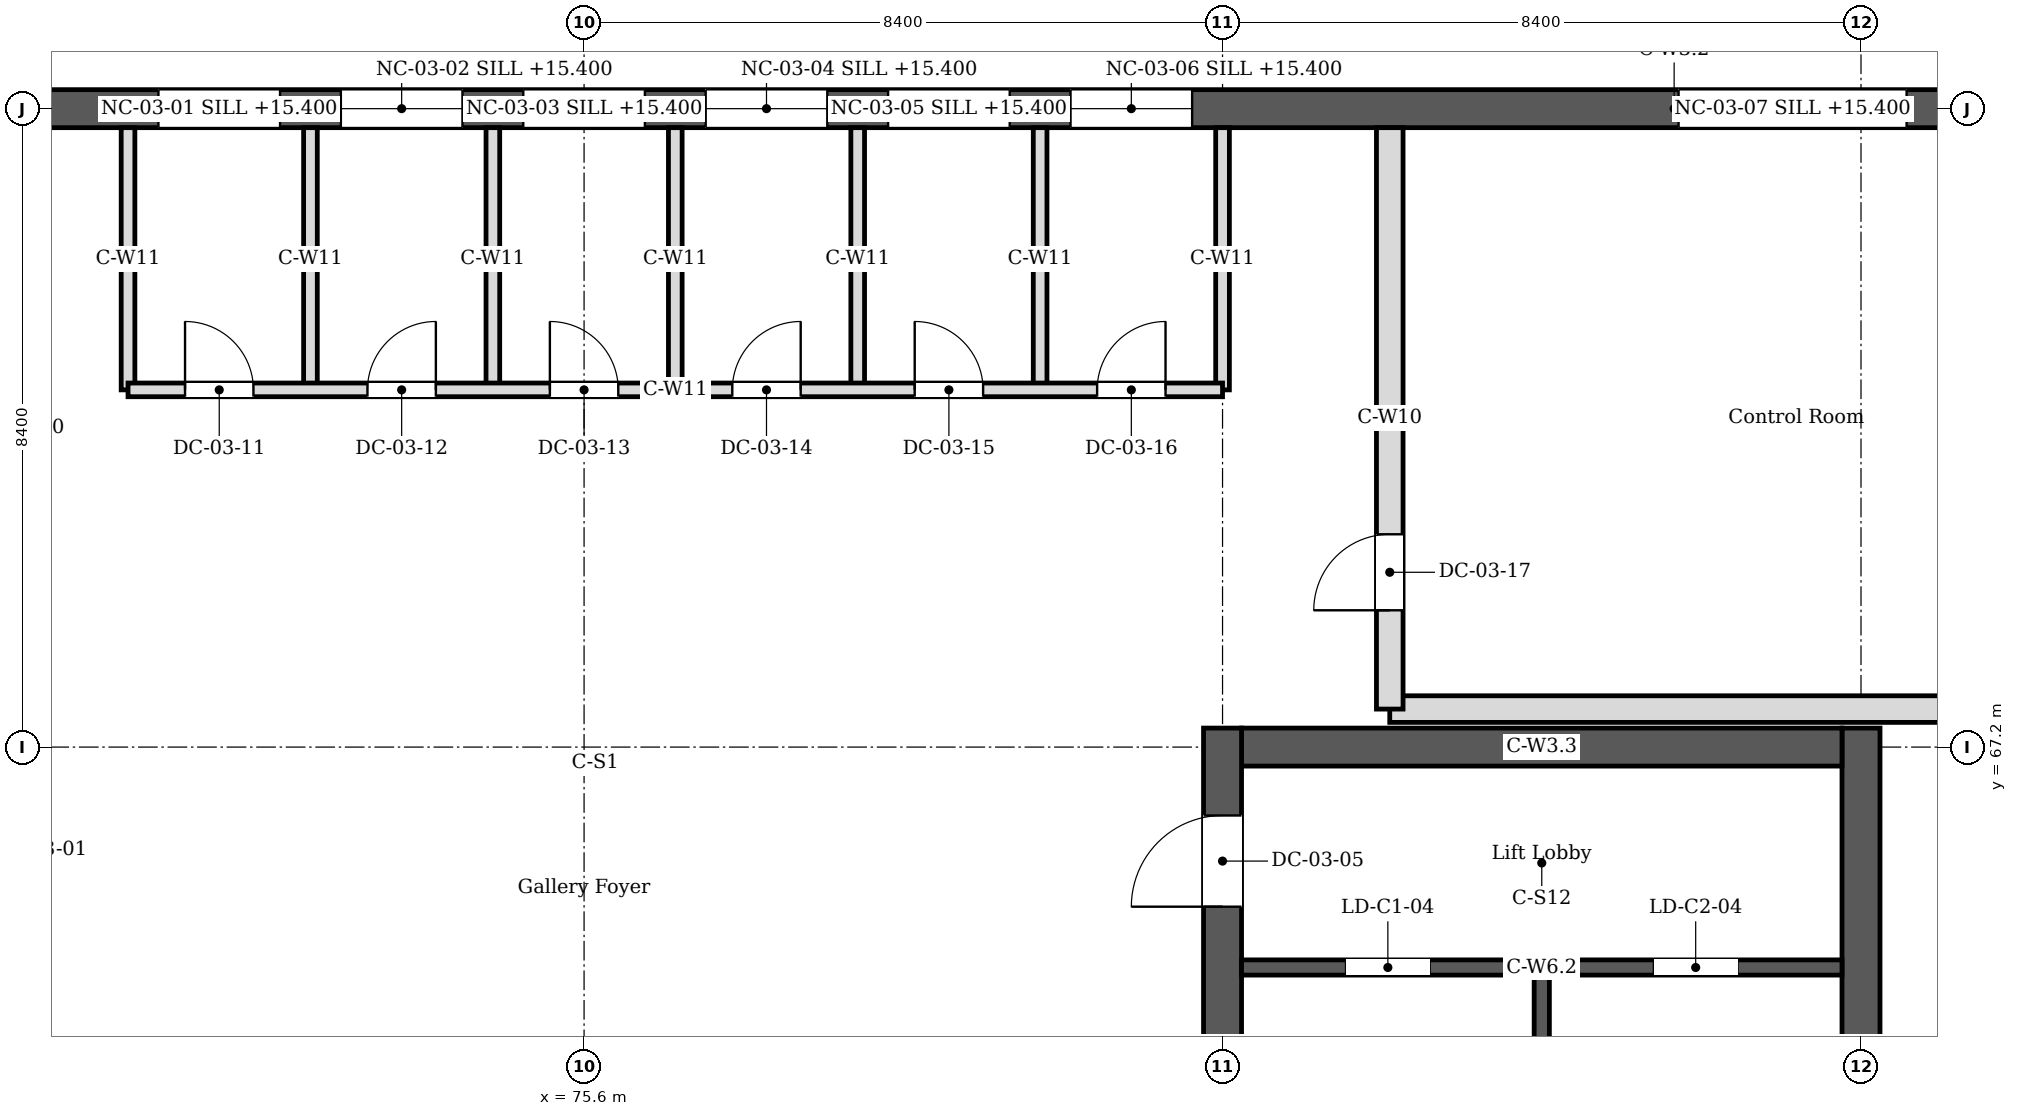
"""IFC4 building model, lengths in metres.
Left out: names, types, materials, properties, quantities, classifications, styles, units other than length and angle.
Written with IfcOpenShell. Run it as: python <this file> out.ifc"""

import sys

from ifc_helpers import new_model, si_unit, direction, frame, frame_2d, origin, place, context, subcontext, project, spatial, rectangle, extrude, element, fill, save


model = new_model("IFC4")
c1 = context("Model", 3, precision=1e-05, world=origin(), true_north=direction((0.0, 1.0)))
c2 = subcontext(c1, "Body", "Model", "MODEL_VIEW")
j1 = project(units=[si_unit("LENGTHUNIT", "METRE"), si_unit("PLANEANGLEUNIT", "RADIAN")], contexts=[c1])
p1 = place(None, origin())
s1 = spatial("IfcSite", under=j1, at=p1, CompositionType="ELEMENT")
p2 = place(p1, origin())
s2 = spatial("IfcBuilding", under=s1, at=p2, CompositionType="ELEMENT")
p3 = place(p2, frame((0.0, 0.0, 14.4)))
s3 = spatial("IfcBuildingStorey", under=s2, at=p3, CompositionType="ELEMENT", Elevation=14.4)
p4 = place(p3, frame((59.25, 75.6, 0.0), z_axis=(0.0, 0.0, 1.0), x_axis=(1.0, 0.0, 0.0)))
e1 = element("IfcWall", 1, at=p4, inside=s3, PredefinedType="SOLIDWALL", context=c2, shape_type="SweptSolid", body=[
    extrude(rectangle(XDim=57.9, YDim=0.5, at=frame_2d((28.95, 0.0))), origin(), (0.0, 0.0, 1.0), 4.2),
])
p5 = place(p4, frame((10.75, 0.0, 1.0)))
e2 = element("IfcOpeningElement", 2, at=p5, cuts=e1, PredefinedType="OPENING", context=c2, shape_type="SweptSolid", body=[
    extrude(rectangle(XDim=1.6, YDim=1.2, at=frame_2d((0.8, 0.6))), frame((0.0, 0.26, 0.0), z_axis=(0.0, -1.0, 0.0), x_axis=(1.0, 0.0, 0.0)), (0.0, 0.0, 1.0), 0.52),
])
p6 = place(p4, frame((13.15, 0.0, 1.0)))
e3 = element("IfcOpeningElement", 3, at=p6, cuts=e1, PredefinedType="OPENING", context=c2, shape_type="SweptSolid", body=[
    extrude(rectangle(XDim=1.6, YDim=1.2, at=frame_2d((0.8, 0.6))), frame((0.0, 0.26, 0.0), z_axis=(0.0, -1.0, 0.0), x_axis=(1.0, 0.0, 0.0)), (0.0, 0.0, 1.0), 0.52),
])
p7 = place(p4, frame((15.55, 0.0, 1.0)))
e4 = element("IfcOpeningElement", 4, at=p7, cuts=e1, PredefinedType="OPENING", context=c2, shape_type="SweptSolid", body=[
    extrude(rectangle(XDim=1.6, YDim=1.2, at=frame_2d((0.8, 0.6))), frame((0.0, 0.26, 0.0), z_axis=(0.0, -1.0, 0.0), x_axis=(1.0, 0.0, 0.0)), (0.0, 0.0, 1.0), 0.52),
])
p8 = place(p4, frame((17.95, 0.0, 1.0)))
e5 = element("IfcOpeningElement", 5, at=p8, cuts=e1, PredefinedType="OPENING", context=c2, shape_type="SweptSolid", body=[
    extrude(rectangle(XDim=1.6, YDim=1.2, at=frame_2d((0.8, 0.6))), frame((0.0, 0.26, 0.0), z_axis=(0.0, -1.0, 0.0), x_axis=(1.0, 0.0, 0.0)), (0.0, 0.0, 1.0), 0.52),
])
p9 = place(p4, frame((20.35, 0.0, 1.0)))
e6 = element("IfcOpeningElement", 6, at=p9, cuts=e1, PredefinedType="OPENING", context=c2, shape_type="SweptSolid", body=[
    extrude(rectangle(XDim=1.6, YDim=1.2, at=frame_2d((0.8, 0.6))), frame((0.0, 0.26, 0.0), z_axis=(0.0, -1.0, 0.0), x_axis=(1.0, 0.0, 0.0)), (0.0, 0.0, 1.0), 0.52),
])
p10 = place(p4, frame((22.75, 0.0, 1.0)))
e7 = element("IfcOpeningElement", 7, at=p10, cuts=e1, PredefinedType="OPENING", context=c2, shape_type="SweptSolid", body=[
    extrude(rectangle(XDim=1.6, YDim=1.2, at=frame_2d((0.8, 0.6))), frame((0.0, 0.26, 0.0), z_axis=(0.0, -1.0, 0.0), x_axis=(1.0, 0.0, 0.0)), (0.0, 0.0, 1.0), 0.52),
])
p11 = place(p4, frame((30.75, 0.0, 1.0)))
e8 = element("IfcOpeningElement", 8, at=p11, cuts=e1, PredefinedType="OPENING", context=c2, shape_type="SweptSolid", body=[
    extrude(rectangle(XDim=3.0, YDim=1.2, at=frame_2d((1.5, 0.6))), frame((0.0, 0.26, 0.0), z_axis=(0.0, -1.0, 0.0), x_axis=(1.0, 0.0, 0.0)), (0.0, 0.0, 1.0), 0.52),
])
p12 = place(p4, frame((42.25, 0.0, 1.0)))
e9 = element("IfcOpeningElement", 9, at=p12, cuts=e1, PredefinedType="OPENING", context=c2, shape_type="SweptSolid", body=[
    extrude(rectangle(XDim=3.0, YDim=1.2, at=frame_2d((1.5, 0.6))), frame((0.0, 0.26, 0.0), z_axis=(0.0, -1.0, 0.0), x_axis=(1.0, 0.0, 0.0)), (0.0, 0.0, 1.0), 0.52),
])
p13 = place(p3, frame((92.4, 59.05, 0.0), z_axis=(0.0, 0.0, 1.0), x_axis=(0.0, 1.0, 0.0)))
e10 = element("IfcWall", 10, at=p13, inside=s3, PredefinedType="SOLIDWALL", context=c2, shape_type="SweptSolid", body=[
    extrude(rectangle(XDim=8.4, YDim=0.5, at=frame_2d((4.2, 0.0))), origin(), (0.0, 0.0, 1.0), 3.8),
])
p14 = place(p3, frame((84.0, 59.05, 0.0), z_axis=(0.0, 0.0, 1.0), x_axis=(0.0, 1.0, 0.0)))
e11 = element("IfcWall", 11, at=p14, inside=s3, PredefinedType="SOLIDWALL", context=c2, shape_type="SweptSolid", body=[
    extrude(rectangle(XDim=8.4, YDim=0.5, at=frame_2d((4.2, 0.0))), origin(), (0.0, 0.0, 1.0), 3.8),
])
p15 = place(p14, frame((6.05, 0.0, 0.0)))
e12 = element("IfcOpeningElement", 12, at=p15, cuts=e11, PredefinedType="OPENING", context=c2, shape_type="SweptSolid", body=[
    extrude(rectangle(XDim=1.2, YDim=2.1, at=frame_2d((0.6, 1.05))), frame((0.0, 0.26, 0.0), z_axis=(0.0, -1.0, 0.0), x_axis=(1.0, 0.0, 0.0)), (0.0, 0.0, 1.0), 0.52),
])
p16 = place(p3, frame((84.25, 67.2, 0.0), z_axis=(0.0, 0.0, 1.0), x_axis=(1.0, 0.0, 0.0)))
e13 = element("IfcWall", 13, at=p16, inside=s3, PredefinedType="SOLIDWALL", context=c2, shape_type="SweptSolid", body=[
    extrude(rectangle(XDim=7.9, YDim=0.5, at=frame_2d((3.95, 0.0))), origin(), (0.0, 0.0, 1.0), 3.8),
])
p17 = place(p3, frame((88.2, 59.05, 0.0), z_axis=(0.0, 0.0, 1.0), x_axis=(0.0, 1.0, 0.0)))
e14 = element("IfcWall", 14, at=p17, inside=s3, PredefinedType="PARTITIONING", context=c2, shape_type="SweptSolid", body=[
    extrude(rectangle(XDim=5.25, YDim=0.2, at=frame_2d((2.625, 0.0))), origin(), (0.0, 0.0, 1.0), 3.8),
])
p18 = place(p3, frame((84.25, 64.3, 0.0), z_axis=(0.0, 0.0, 1.0), x_axis=(1.0, 0.0, 0.0)))
e15 = element("IfcWall", 15, at=p18, inside=s3, PredefinedType="PARTITIONING", context=c2, shape_type="SweptSolid", body=[
    extrude(rectangle(XDim=7.9, YDim=0.2, at=frame_2d((3.95, 0.0))), origin(), (0.0, 0.0, 1.0), 3.8),
])
p19 = place(p18, frame((1.375, 0.0, 0.0)))
e16 = element("IfcOpeningElement", 16, at=p19, cuts=e15, PredefinedType="OPENING", context=c2, shape_type="SweptSolid", body=[
    extrude(rectangle(XDim=1.1, YDim=2.1, at=frame_2d((0.55, 1.05))), frame((0.0, 0.11, 0.0), z_axis=(0.0, -1.0, 0.0), x_axis=(1.0, 0.0, 0.0)), (0.0, 0.0, 1.0), 0.22),
])
p20 = place(p18, frame((5.425, 0.0, 0.0)))
e17 = element("IfcOpeningElement", 17, at=p20, cuts=e15, PredefinedType="OPENING", context=c2, shape_type="SweptSolid", body=[
    extrude(rectangle(XDim=1.1, YDim=2.1, at=frame_2d((0.55, 1.05))), frame((0.0, 0.11, 0.0), z_axis=(0.0, -1.0, 0.0), x_axis=(1.0, 0.0, 0.0)), (0.0, 0.0, 1.0), 0.22),
])
for number, where, z_axis, x_axis in (
    (18, (69.6, 71.9, 0.0), (0.0, 0.0, 1.0), (0.0, 1.0, 0.0)),
    (19, (72.0, 71.9, 0.0), (0.0, 0.0, 1.0), (0.0, 1.0, 0.0)),
    (20, (74.4, 71.9, 0.0), (0.0, 0.0, 1.0), (0.0, 1.0, 0.0)),
    (21, (76.8, 71.9, 0.0), (0.0, 0.0, 1.0), (0.0, 1.0, 0.0)),
    (22, (79.2, 71.9, 0.0), (0.0, 0.0, 1.0), (0.0, 1.0, 0.0)),
    (23, (81.6, 71.9, 0.0), (0.0, 0.0, 1.0), (0.0, 1.0, 0.0)),
    (24, (84.0, 71.9, 0.0), (0.0, 0.0, 1.0), (0.0, 1.0, 0.0)),
):
    element("IfcWall", number, at=place(p3, frame(where, z_axis=z_axis, x_axis=x_axis)), inside=s3, PredefinedType="PARTITIONING", context=c2, shape_type="SweptSolid", body=[
        extrude(rectangle(XDim=3.45, YDim=0.18, at=frame_2d((1.725, 0.0))), origin(), (0.0, 0.0, 1.0), 2.85),
    ])
p21 = place(p3, frame((69.6, 71.9, 0.0), z_axis=(0.0, 0.0, 1.0), x_axis=(1.0, 0.0, 0.0)))
e25 = element("IfcWall", 25, at=p21, inside=s3, PredefinedType="PARTITIONING", context=c2, shape_type="SweptSolid", body=[
    extrude(rectangle(XDim=14.4, YDim=0.18, at=frame_2d((7.2, 0.0))), origin(), (0.0, 0.0, 1.0), 2.85),
])
p22 = place(p21, frame((0.75, 0.0, 0.0)))
e26 = element("IfcOpeningElement", 26, at=p22, cuts=e25, PredefinedType="OPENING", context=c2, shape_type="SweptSolid", body=[
    extrude(rectangle(XDim=0.9, YDim=2.1, at=frame_2d((0.45, 1.05))), frame((0.0, 0.1, 0.0), z_axis=(0.0, -1.0, 0.0), x_axis=(1.0, 0.0, 0.0)), (0.0, 0.0, 1.0), 0.2),
])
p23 = place(p21, frame((3.15, 0.0, 0.0)))
e27 = element("IfcOpeningElement", 27, at=p23, cuts=e25, PredefinedType="OPENING", context=c2, shape_type="SweptSolid", body=[
    extrude(rectangle(XDim=0.9, YDim=2.1, at=frame_2d((0.45, 1.05))), frame((0.0, 0.1, 0.0), z_axis=(0.0, -1.0, 0.0), x_axis=(1.0, 0.0, 0.0)), (0.0, 0.0, 1.0), 0.2),
])
p24 = place(p21, frame((5.55, 0.0, 0.0)))
e28 = element("IfcOpeningElement", 28, at=p24, cuts=e25, PredefinedType="OPENING", context=c2, shape_type="SweptSolid", body=[
    extrude(rectangle(XDim=0.9, YDim=2.1, at=frame_2d((0.45, 1.05))), frame((0.0, 0.1, 0.0), z_axis=(0.0, -1.0, 0.0), x_axis=(1.0, 0.0, 0.0)), (0.0, 0.0, 1.0), 0.2),
])
p25 = place(p21, frame((7.95, 0.0, 0.0)))
e29 = element("IfcOpeningElement", 29, at=p25, cuts=e25, PredefinedType="OPENING", context=c2, shape_type="SweptSolid", body=[
    extrude(rectangle(XDim=0.9, YDim=2.1, at=frame_2d((0.45, 1.05))), frame((0.0, 0.1, 0.0), z_axis=(0.0, -1.0, 0.0), x_axis=(1.0, 0.0, 0.0)), (0.0, 0.0, 1.0), 0.2),
])
p26 = place(p21, frame((10.35, 0.0, 0.0)))
e30 = element("IfcOpeningElement", 30, at=p26, cuts=e25, PredefinedType="OPENING", context=c2, shape_type="SweptSolid", body=[
    extrude(rectangle(XDim=0.9, YDim=2.1, at=frame_2d((0.45, 1.05))), frame((0.0, 0.1, 0.0), z_axis=(0.0, -1.0, 0.0), x_axis=(1.0, 0.0, 0.0)), (0.0, 0.0, 1.0), 0.2),
])
p27 = place(p21, frame((12.75, 0.0, 0.0)))
e31 = element("IfcOpeningElement", 31, at=p27, cuts=e25, PredefinedType="OPENING", context=c2, shape_type="SweptSolid", body=[
    extrude(rectangle(XDim=0.9, YDim=2.1, at=frame_2d((0.45, 1.05))), frame((0.0, 0.1, 0.0), z_axis=(0.0, -1.0, 0.0), x_axis=(1.0, 0.0, 0.0)), (0.0, 0.0, 1.0), 0.2),
])
p28 = place(p3, frame((86.2, 67.7, 0.0), z_axis=(0.0, 0.0, 1.0), x_axis=(0.0, 1.0, 0.0)))
e32 = element("IfcWall", 32, at=p28, inside=s3, PredefinedType="PARTITIONING", context=c2, shape_type="SweptSolid", body=[
    extrude(rectangle(XDim=7.65, YDim=0.35, at=frame_2d((3.825, 0.0))), origin(), (0.0, 0.0, 1.0), 2.85),
])
p29 = place(p28, frame((1.3, 0.0, 0.0)))
e33 = element("IfcOpeningElement", 33, at=p29, cuts=e32, PredefinedType="OPENING", context=c2, shape_type="SweptSolid", body=[
    extrude(rectangle(XDim=1.0, YDim=2.1, at=frame_2d((0.5, 1.05))), frame((0.0, 0.185, 0.0), z_axis=(0.0, -1.0, 0.0), x_axis=(1.0, 0.0, 0.0)), (0.0, 0.0, 1.0), 0.37),
])
p30 = place(p3, frame((86.2, 67.7, 0.0), z_axis=(0.0, 0.0, 1.0), x_axis=(1.0, 0.0, 0.0)))
e34 = element("IfcWall", 34, at=p30, inside=s3, PredefinedType="PARTITIONING", context=c2, shape_type="SweptSolid", body=[
    extrude(rectangle(XDim=23.0, YDim=0.35, at=frame_2d((11.5, 0.0))), origin(), (0.0, 0.0, 1.0), 2.85),
])
p31 = place(p30, frame((15.3, 0.0, 0.0)))
e35 = element("IfcOpeningElement", 35, at=p31, cuts=e34, PredefinedType="OPENING", context=c2, shape_type="SweptSolid", body=[
    extrude(rectangle(XDim=1.0, YDim=2.1, at=frame_2d((0.5, 1.05))), frame((0.0, 0.185, 0.0), z_axis=(0.0, -1.0, 0.0), x_axis=(1.0, 0.0, 0.0)), (0.0, 0.0, 1.0), 0.37),
])
p32 = place(p19, origin())
e36 = element("IfcDoor", 36, at=p32, inside=s3, OperationType="SLIDING_TO_LEFT", PredefinedType="DOOR", context=c2, shape_type="SweptSolid", body=[
    extrude(rectangle(XDim=1.1, YDim=2.1, at=frame_2d((0.55, 1.05))), frame((0.0, 0.025, 0.0), z_axis=(0.0, -1.0, 0.0), x_axis=(1.0, 0.0, 0.0)), (0.0, 0.0, 1.0), 0.05),
])
fill(e16, e36)
p33 = place(p20, origin())
e37 = element("IfcDoor", 37, at=p33, inside=s3, OperationType="SLIDING_TO_LEFT", PredefinedType="DOOR", context=c2, shape_type="SweptSolid", body=[
    extrude(rectangle(XDim=1.1, YDim=2.1, at=frame_2d((0.55, 1.05))), frame((0.0, 0.025, 0.0), z_axis=(0.0, -1.0, 0.0), x_axis=(1.0, 0.0, 0.0)), (0.0, 0.0, 1.0), 0.05),
])
fill(e17, e37)
p34 = place(p15, origin())
e38 = element("IfcDoor", 38, at=p34, inside=s3, OperationType="SINGLE_SWING_LEFT", PredefinedType="DOOR", context=c2, shape_type="SweptSolid", body=[
    extrude(rectangle(XDim=1.2, YDim=2.1, at=frame_2d((0.6, 1.05))), frame((0.0, 0.025, 0.0), z_axis=(0.0, -1.0, 0.0), x_axis=(1.0, 0.0, 0.0)), (0.0, 0.0, 1.0), 0.05),
])
fill(e12, e38)
p35 = place(p22, origin())
e39 = element("IfcDoor", 39, at=p35, inside=s3, OperationType="SINGLE_SWING_LEFT", PredefinedType="DOOR", context=c2, shape_type="SweptSolid", body=[
    extrude(rectangle(XDim=0.9, YDim=2.1, at=frame_2d((0.45, 1.05))), frame((0.0, 0.025, 0.0), z_axis=(0.0, -1.0, 0.0), x_axis=(1.0, 0.0, 0.0)), (0.0, 0.0, 1.0), 0.05),
])
fill(e26, e39)
p36 = place(p23, origin())
e40 = element("IfcDoor", 40, at=p36, inside=s3, OperationType="SINGLE_SWING_LEFT", PredefinedType="DOOR", context=c2, shape_type="SweptSolid", body=[
    extrude(rectangle(XDim=0.9, YDim=2.1, at=frame_2d((0.45, 1.05))), frame((0.0, 0.025, 0.0), z_axis=(0.0, -1.0, 0.0), x_axis=(1.0, 0.0, 0.0)), (0.0, 0.0, 1.0), 0.05),
])
fill(e27, e40)
p37 = place(p24, origin())
e41 = element("IfcDoor", 41, at=p37, inside=s3, OperationType="SINGLE_SWING_LEFT", PredefinedType="DOOR", context=c2, shape_type="SweptSolid", body=[
    extrude(rectangle(XDim=0.9, YDim=2.1, at=frame_2d((0.45, 1.05))), frame((0.0, 0.025, 0.0), z_axis=(0.0, -1.0, 0.0), x_axis=(1.0, 0.0, 0.0)), (0.0, 0.0, 1.0), 0.05),
])
fill(e28, e41)
p38 = place(p25, origin())
e42 = element("IfcDoor", 42, at=p38, inside=s3, OperationType="SINGLE_SWING_LEFT", PredefinedType="DOOR", context=c2, shape_type="SweptSolid", body=[
    extrude(rectangle(XDim=0.9, YDim=2.1, at=frame_2d((0.45, 1.05))), frame((0.0, 0.025, 0.0), z_axis=(0.0, -1.0, 0.0), x_axis=(1.0, 0.0, 0.0)), (0.0, 0.0, 1.0), 0.05),
])
fill(e29, e42)
p39 = place(p26, origin())
e43 = element("IfcDoor", 43, at=p39, inside=s3, OperationType="SINGLE_SWING_LEFT", PredefinedType="DOOR", context=c2, shape_type="SweptSolid", body=[
    extrude(rectangle(XDim=0.9, YDim=2.1, at=frame_2d((0.45, 1.05))), frame((0.0, 0.025, 0.0), z_axis=(0.0, -1.0, 0.0), x_axis=(1.0, 0.0, 0.0)), (0.0, 0.0, 1.0), 0.05),
])
fill(e30, e43)
p40 = place(p27, origin())
e44 = element("IfcDoor", 44, at=p40, inside=s3, OperationType="SINGLE_SWING_LEFT", PredefinedType="DOOR", context=c2, shape_type="SweptSolid", body=[
    extrude(rectangle(XDim=0.9, YDim=2.1, at=frame_2d((0.45, 1.05))), frame((0.0, 0.025, 0.0), z_axis=(0.0, -1.0, 0.0), x_axis=(1.0, 0.0, 0.0)), (0.0, 0.0, 1.0), 0.05),
])
fill(e31, e44)
p41 = place(p29, origin())
e45 = element("IfcDoor", 45, at=p41, inside=s3, OperationType="SINGLE_SWING_LEFT", PredefinedType="DOOR", context=c2, shape_type="SweptSolid", body=[
    extrude(rectangle(XDim=1.0, YDim=2.1, at=frame_2d((0.5, 1.05))), frame((0.0, 0.025, 0.0), z_axis=(0.0, -1.0, 0.0), x_axis=(1.0, 0.0, 0.0)), (0.0, 0.0, 1.0), 0.05),
])
fill(e33, e45)
p42 = place(p5, origin())
e46 = element("IfcWindow", 46, at=p42, inside=s3, PartitioningType="SINGLE_PANEL", PredefinedType="WINDOW", context=c2, shape_type="SweptSolid", body=[
    extrude(rectangle(XDim=1.6, YDim=1.2, at=frame_2d((0.8, 0.6))), frame((0.0, 0.03, 0.0), z_axis=(0.0, -1.0, 0.0), x_axis=(1.0, 0.0, 0.0)), (0.0, 0.0, 1.0), 0.06),
])
fill(e2, e46)
p43 = place(p6, origin())
e47 = element("IfcWindow", 47, at=p43, inside=s3, PartitioningType="SINGLE_PANEL", PredefinedType="WINDOW", context=c2, shape_type="SweptSolid", body=[
    extrude(rectangle(XDim=1.6, YDim=1.2, at=frame_2d((0.8, 0.6))), frame((0.0, 0.03, 0.0), z_axis=(0.0, -1.0, 0.0), x_axis=(1.0, 0.0, 0.0)), (0.0, 0.0, 1.0), 0.06),
])
fill(e3, e47)
p44 = place(p7, origin())
e48 = element("IfcWindow", 48, at=p44, inside=s3, PartitioningType="SINGLE_PANEL", PredefinedType="WINDOW", context=c2, shape_type="SweptSolid", body=[
    extrude(rectangle(XDim=1.6, YDim=1.2, at=frame_2d((0.8, 0.6))), frame((0.0, 0.03, 0.0), z_axis=(0.0, -1.0, 0.0), x_axis=(1.0, 0.0, 0.0)), (0.0, 0.0, 1.0), 0.06),
])
fill(e4, e48)
p45 = place(p8, origin())
e49 = element("IfcWindow", 49, at=p45, inside=s3, PartitioningType="SINGLE_PANEL", PredefinedType="WINDOW", context=c2, shape_type="SweptSolid", body=[
    extrude(rectangle(XDim=1.6, YDim=1.2, at=frame_2d((0.8, 0.6))), frame((0.0, 0.03, 0.0), z_axis=(0.0, -1.0, 0.0), x_axis=(1.0, 0.0, 0.0)), (0.0, 0.0, 1.0), 0.06),
])
fill(e5, e49)
p46 = place(p9, origin())
e50 = element("IfcWindow", 50, at=p46, inside=s3, PartitioningType="SINGLE_PANEL", PredefinedType="WINDOW", context=c2, shape_type="SweptSolid", body=[
    extrude(rectangle(XDim=1.6, YDim=1.2, at=frame_2d((0.8, 0.6))), frame((0.0, 0.03, 0.0), z_axis=(0.0, -1.0, 0.0), x_axis=(1.0, 0.0, 0.0)), (0.0, 0.0, 1.0), 0.06),
])
fill(e6, e50)
p47 = place(p10, origin())
e51 = element("IfcWindow", 51, at=p47, inside=s3, PartitioningType="SINGLE_PANEL", PredefinedType="WINDOW", context=c2, shape_type="SweptSolid", body=[
    extrude(rectangle(XDim=1.6, YDim=1.2, at=frame_2d((0.8, 0.6))), frame((0.0, 0.03, 0.0), z_axis=(0.0, -1.0, 0.0), x_axis=(1.0, 0.0, 0.0)), (0.0, 0.0, 1.0), 0.06),
])
fill(e7, e51)
p48 = place(p11, origin())
e52 = element("IfcWindow", 52, at=p48, inside=s3, PartitioningType="SINGLE_PANEL", PredefinedType="WINDOW", context=c2, shape_type="SweptSolid", body=[
    extrude(rectangle(XDim=3.0, YDim=1.2, at=frame_2d((1.5, 0.6))), frame((0.0, 0.03, 0.0), z_axis=(0.0, -1.0, 0.0), x_axis=(1.0, 0.0, 0.0)), (0.0, 0.0, 1.0), 0.06),
])
fill(e8, e52)
save(model, sys.argv[1])
